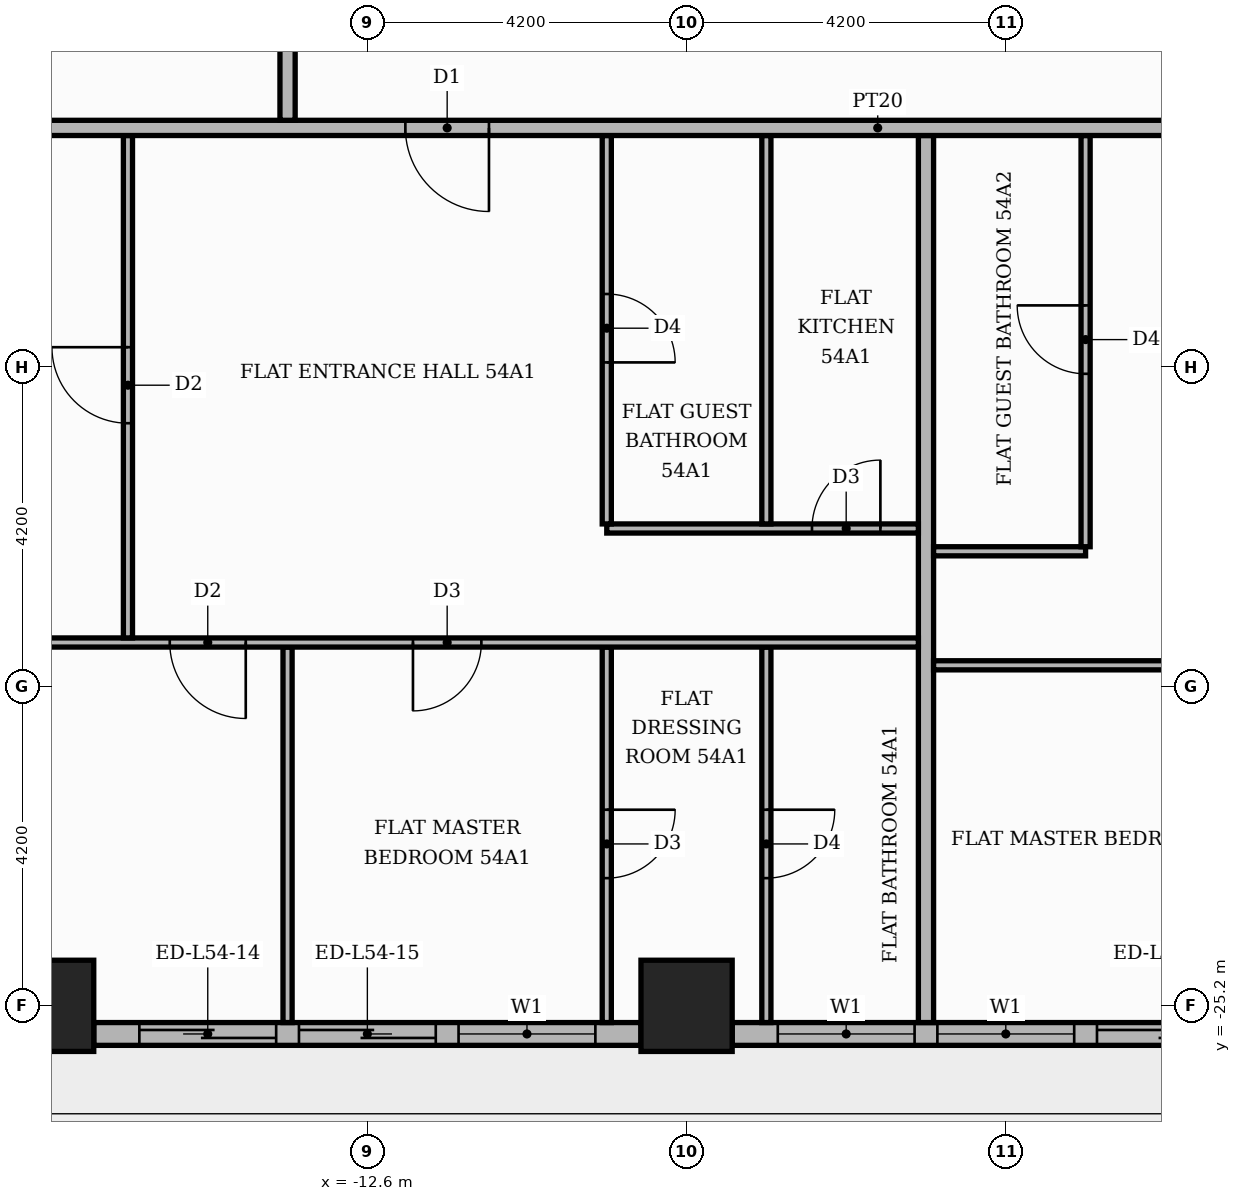
"""IFC4 building model, lengths in metres.
Left out: names, types, materials, properties, quantities, classifications, styles, units other than length and angle.
Written with IfcOpenShell. Run it as: python <this file> out.ifc"""

import sys

from ifc_helpers import new_model, si_unit, direction, frame, frame_2d, origin, origin_2d, place, context, subcontext, project, spatial, rectangle, extrude, element, fill, save


model = new_model("IFC4")
c1 = context("Model", 3, precision=1e-05, world=origin(), true_north=direction((0.0, 1.0)))
c2 = subcontext(c1, "Body", "Model", "MODEL_VIEW")
j1 = project(units=[si_unit("LENGTHUNIT", "METRE"), si_unit("PLANEANGLEUNIT", "RADIAN")], contexts=[c1])
p1 = place(None, origin())
s1 = spatial("IfcSite", under=j1, at=p1, CompositionType="ELEMENT")
p2 = place(p1, origin())
s2 = spatial("IfcBuilding", under=s1, at=p2, CompositionType="ELEMENT")
p3 = place(p2, frame((0.0, 0.0, 227.4)))
s3 = spatial("IfcBuildingStorey", under=s2, at=p3, CompositionType="ELEMENT", Elevation=227.4)
for number, where, z_axis, x_axis in (
    (1, (-8.4, -25.2, 0.0), (0.0, 0.0, 1.0), (1.0, 0.0, 0.0)),
    (2, (-16.8, -25.2, 0.0), (0.0, 0.0, 1.0), (1.0, 0.0, 0.0)),
):
    element("IfcColumn", number, at=place(p3, frame(where, z_axis=z_axis, x_axis=x_axis)), inside=s3, PredefinedType="COLUMN", context=c2, shape_type="SweptSolid", body=[
        extrude(rectangle(XDim=1.2, YDim=1.2, at=origin_2d()), origin(), (0.0, 0.0, 1.0), 3.9),
    ])
p4 = place(p3, frame((-16.2, -25.57, 0.0), z_axis=(0.0, 0.0, 1.0), x_axis=(1.0, 0.0, 0.0)))
e3 = element("IfcWall", 3, at=p4, inside=s3, PredefinedType="STANDARD", context=c2, shape_type="SweptSolid", body=[
    extrude(rectangle(XDim=7.2, YDim=0.3, at=frame_2d((3.6, 0.0))), origin(), (0.0, 0.0, 1.0), 3.48),
])
p5 = place(p4, frame((0.6, 0.0, 0.0)))
e4 = element("IfcOpeningElement", 4, at=p5, cuts=e3, PredefinedType="OPENING", context=c2, shape_type="SweptSolid", body=[
    extrude(rectangle(XDim=1.8, YDim=2.4, at=frame_2d((0.9, 1.2))), frame((0.0, 0.16, 0.0), z_axis=(0.0, -1.0, 0.0), x_axis=(1.0, 0.0, 0.0)), (0.0, 0.0, 1.0), 0.32),
])
p6 = place(p4, frame((2.7, 0.0, 0.0)))
e5 = element("IfcOpeningElement", 5, at=p6, cuts=e3, PredefinedType="OPENING", context=c2, shape_type="SweptSolid", body=[
    extrude(rectangle(XDim=1.8, YDim=2.4, at=frame_2d((0.9, 1.2))), frame((0.0, 0.16, 0.0), z_axis=(0.0, -1.0, 0.0), x_axis=(1.0, 0.0, 0.0)), (0.0, 0.0, 1.0), 0.32),
])
p7 = place(p4, frame((4.8, 0.0, 0.9)))
e6 = element("IfcOpeningElement", 6, at=p7, cuts=e3, PredefinedType="OPENING", context=c2, shape_type="SweptSolid", body=[
    extrude(rectangle(XDim=1.8, YDim=2.1, at=frame_2d((0.9, 1.05))), frame((0.0, 0.16, 0.0), z_axis=(0.0, -1.0, 0.0), x_axis=(1.0, 0.0, 0.0)), (0.0, 0.0, 1.0), 0.32),
])
p8 = place(p3, frame((-7.8, -25.57, 0.0), z_axis=(0.0, 0.0, 1.0), x_axis=(1.0, 0.0, 0.0)))
e7 = element("IfcWall", 7, at=p8, inside=s3, PredefinedType="STANDARD", context=c2, shape_type="SweptSolid", body=[
    extrude(rectangle(XDim=7.2, YDim=0.3, at=frame_2d((3.6, 0.0))), origin(), (0.0, 0.0, 1.0), 3.48),
])
p9 = place(p8, frame((0.6, 0.0, 0.9)))
e8 = element("IfcOpeningElement", 8, at=p9, cuts=e7, PredefinedType="OPENING", context=c2, shape_type="SweptSolid", body=[
    extrude(rectangle(XDim=1.8, YDim=2.1, at=frame_2d((0.9, 1.05))), frame((0.0, 0.16, 0.0), z_axis=(0.0, -1.0, 0.0), x_axis=(1.0, 0.0, 0.0)), (0.0, 0.0, 1.0), 0.32),
])
p10 = place(p8, frame((2.7, 0.0, 0.9)))
e9 = element("IfcOpeningElement", 9, at=p10, cuts=e7, PredefinedType="OPENING", context=c2, shape_type="SweptSolid", body=[
    extrude(rectangle(XDim=1.8, YDim=2.1, at=frame_2d((0.9, 1.05))), frame((0.0, 0.16, 0.0), z_axis=(0.0, -1.0, 0.0), x_axis=(1.0, 0.0, 0.0)), (0.0, 0.0, 1.0), 0.32),
])
p11 = place(p8, frame((4.8, 0.0, 0.0)))
e10 = element("IfcOpeningElement", 10, at=p11, cuts=e7, PredefinedType="OPENING", context=c2, shape_type="SweptSolid", body=[
    extrude(rectangle(XDim=1.8, YDim=2.4, at=frame_2d((0.9, 1.2))), frame((0.0, 0.16, 0.0), z_axis=(0.0, -1.0, 0.0), x_axis=(1.0, 0.0, 0.0)), (0.0, 0.0, 1.0), 0.32),
])
p12 = place(p3, frame((-13.65, -25.42, 0.0), z_axis=(0.0, 0.0, 1.0), x_axis=(0.0, 1.0, 0.0)))
e11 = element("IfcWall", 11, at=p12, inside=s3, PredefinedType="PARTITIONING", context=c2, shape_type="SweptSolid", body=[
    extrude(rectangle(XDim=4.94, YDim=0.12, at=frame_2d((2.47, 0.0))), origin(), (0.0, 0.0, 1.0), 3.48),
])
p13 = place(p3, frame((-9.45, -25.42, 0.0), z_axis=(0.0, 0.0, 1.0), x_axis=(0.0, 1.0, 0.0)))
e12 = element("IfcWall", 12, at=p13, inside=s3, PredefinedType="PARTITIONING", context=c2, shape_type="SweptSolid", body=[
    extrude(rectangle(XDim=4.94, YDim=0.12, at=frame_2d((2.47, 0.0))), origin(), (0.0, 0.0, 1.0), 3.48),
])
p14 = place(p13, frame((1.9, 0.0, 0.0)))
e13 = element("IfcOpeningElement", 13, at=p14, cuts=e12, PredefinedType="OPENING", context=c2, shape_type="SweptSolid", body=[
    extrude(rectangle(XDim=0.9, YDim=2.1, at=frame_2d((0.45, 1.05))), frame((0.0, 0.07, 0.0), z_axis=(0.0, -1.0, 0.0), x_axis=(1.0, 0.0, 0.0)), (0.0, 0.0, 1.0), 0.14),
])
p15 = place(p3, frame((-7.35, -25.42, 0.0), z_axis=(0.0, 0.0, 1.0), x_axis=(0.0, 1.0, 0.0)))
e14 = element("IfcWall", 14, at=p15, inside=s3, PredefinedType="PARTITIONING", context=c2, shape_type="SweptSolid", body=[
    extrude(rectangle(XDim=4.94, YDim=0.12, at=frame_2d((2.47, 0.0))), origin(), (0.0, 0.0, 1.0), 3.48),
])
p16 = place(p15, frame((1.9, 0.0, 0.0)))
e15 = element("IfcOpeningElement", 15, at=p16, cuts=e14, PredefinedType="OPENING", context=c2, shape_type="SweptSolid", body=[
    extrude(rectangle(XDim=0.9, YDim=2.1, at=frame_2d((0.45, 1.05))), frame((0.0, 0.07, 0.0), z_axis=(0.0, -1.0, 0.0), x_axis=(1.0, 0.0, 0.0)), (0.0, 0.0, 1.0), 0.14),
])
p17 = place(p3, frame((-5.25, -25.42, 0.0), z_axis=(0.0, 0.0, 1.0), x_axis=(0.0, 1.0, 0.0)))
e16 = element("IfcWall", 16, at=p17, inside=s3, PredefinedType="PARTITIONING", context=c2, shape_type="SweptSolid", body=[
    extrude(rectangle(XDim=11.67, YDim=0.2, at=frame_2d((5.835, 0.0))), origin(), (0.0, 0.0, 1.0), 3.48),
])
p18 = place(p3, frame((-5.15, -20.72, 0.0), z_axis=(0.0, 0.0, 1.0), x_axis=(1.0, 0.0, 0.0)))
e17 = element("IfcWall", 17, at=p18, inside=s3, PredefinedType="PARTITIONING", context=c2, shape_type="SweptSolid", body=[
    extrude(rectangle(XDim=18.7, YDim=0.12, at=frame_2d((9.35, 0.0))), origin(), (0.0, 0.0, 1.0), 3.48),
])
p19 = place(p18, frame((3.65, 0.0, 0.0)))
e18 = element("IfcOpeningElement", 18, at=p19, cuts=e17, PredefinedType="OPENING", context=c2, shape_type="SweptSolid", body=[
    extrude(rectangle(XDim=0.9, YDim=2.1, at=frame_2d((0.45, 1.05))), frame((0.0, 0.07, 0.0), z_axis=(0.0, -1.0, 0.0), x_axis=(1.0, 0.0, 0.0)), (0.0, 0.0, 1.0), 0.14),
])
p20 = place(p18, frame((15.15, 0.0, 0.0)))
e19 = element("IfcOpeningElement", 19, at=p20, cuts=e17, PredefinedType="OPENING", context=c2, shape_type="SweptSolid", body=[
    extrude(rectangle(XDim=1.0, YDim=2.1, at=frame_2d((0.5, 1.05))), frame((0.0, 0.07, 0.0), z_axis=(0.0, -1.0, 0.0), x_axis=(1.0, 0.0, 0.0)), (0.0, 0.0, 1.0), 0.14),
])
p21 = place(p3, frame((-21.219, -20.42, 0.0), z_axis=(0.0, 0.0, 1.0), x_axis=(1.0, 0.0, 0.0)))
e20 = element("IfcWall", 20, at=p21, inside=s3, PredefinedType="PARTITIONING", context=c2, shape_type="SweptSolid", body=[
    extrude(rectangle(XDim=15.869, YDim=0.12, at=frame_2d((7.935, 0.0))), origin(), (0.0, 0.0, 1.0), 3.48),
])
p22 = place(p21, frame((6.019, 0.0, 0.0)))
e21 = element("IfcOpeningElement", 21, at=p22, cuts=e20, PredefinedType="OPENING", context=c2, shape_type="SweptSolid", body=[
    extrude(rectangle(XDim=1.0, YDim=2.1, at=frame_2d((0.5, 1.05))), frame((0.0, 0.07, 0.0), z_axis=(0.0, -1.0, 0.0), x_axis=(1.0, 0.0, 0.0)), (0.0, 0.0, 1.0), 0.14),
])
p23 = place(p21, frame((9.219, 0.0, 0.0)))
e22 = element("IfcOpeningElement", 22, at=p23, cuts=e20, PredefinedType="OPENING", context=c2, shape_type="SweptSolid", body=[
    extrude(rectangle(XDim=0.9, YDim=2.1, at=frame_2d((0.45, 1.05))), frame((0.0, 0.07, 0.0), z_axis=(0.0, -1.0, 0.0), x_axis=(1.0, 0.0, 0.0)), (0.0, 0.0, 1.0), 0.14),
])
p24 = place(p3, frame((-15.75, -20.36, 0.0), z_axis=(0.0, 0.0, 1.0), x_axis=(0.0, 1.0, 0.0)))
e23 = element("IfcWall", 23, at=p24, inside=s3, PredefinedType="PARTITIONING", context=c2, shape_type="SweptSolid", body=[
    extrude(rectangle(XDim=6.61, YDim=0.12, at=frame_2d((3.305, 0.0))), origin(), (0.0, 0.0, 1.0), 3.48),
])
p25 = place(p24, frame((2.825, 0.0, 0.0)))
e24 = element("IfcOpeningElement", 24, at=p25, cuts=e23, PredefinedType="OPENING", context=c2, shape_type="SweptSolid", body=[
    extrude(rectangle(XDim=1.0, YDim=2.1, at=frame_2d((0.5, 1.05))), frame((0.0, 0.07, 0.0), z_axis=(0.0, -1.0, 0.0), x_axis=(1.0, 0.0, 0.0)), (0.0, 0.0, 1.0), 0.14),
])
p26 = place(p3, frame((-5.15, -19.22, 0.0), z_axis=(0.0, 0.0, 1.0), x_axis=(1.0, 0.0, 0.0)))
e25 = element("IfcWall", 25, at=p26, inside=s3, PredefinedType="PARTITIONING", context=c2, shape_type="SweptSolid", body=[
    extrude(rectangle(XDim=2.0, YDim=0.12, at=frame_2d((1.0, 0.0))), origin(), (0.0, 0.0, 1.0), 3.48),
])
p27 = place(p3, frame((-3.15, -19.16, 0.0), z_axis=(0.0, 0.0, 1.0), x_axis=(0.0, 1.0, 0.0)))
e26 = element("IfcWall", 26, at=p27, inside=s3, PredefinedType="PARTITIONING", context=c2, shape_type="SweptSolid", body=[
    extrude(rectangle(XDim=5.41, YDim=0.12, at=frame_2d((2.705, 0.0))), origin(), (0.0, 0.0, 1.0), 3.48),
])
p28 = place(p27, frame((2.275, 0.0, 0.0)))
e27 = element("IfcOpeningElement", 27, at=p28, cuts=e26, PredefinedType="OPENING", context=c2, shape_type="SweptSolid", body=[
    extrude(rectangle(XDim=0.9, YDim=2.1, at=frame_2d((0.45, 1.05))), frame((0.0, 0.07, 0.0), z_axis=(0.0, -1.0, 0.0), x_axis=(1.0, 0.0, 0.0)), (0.0, 0.0, 1.0), 0.14),
])
p29 = place(p3, frame((-9.45, -18.92, 0.0), z_axis=(0.0, 0.0, 1.0), x_axis=(1.0, 0.0, 0.0)))
e28 = element("IfcWall", 28, at=p29, inside=s3, PredefinedType="PARTITIONING", context=c2, shape_type="SweptSolid", body=[
    extrude(rectangle(XDim=4.1, YDim=0.12, at=frame_2d((2.05, 0.0))), origin(), (0.0, 0.0, 1.0), 3.48),
])
p30 = place(p29, frame((2.7, 0.0, 0.0)))
e29 = element("IfcOpeningElement", 29, at=p30, cuts=e28, PredefinedType="OPENING", context=c2, shape_type="SweptSolid", body=[
    extrude(rectangle(XDim=0.9, YDim=2.1, at=frame_2d((0.45, 1.05))), frame((0.0, 0.07, 0.0), z_axis=(0.0, -1.0, 0.0), x_axis=(1.0, 0.0, 0.0)), (0.0, 0.0, 1.0), 0.14),
])
p31 = place(p3, frame((-9.45, -18.86, 0.0), z_axis=(0.0, 0.0, 1.0), x_axis=(0.0, 1.0, 0.0)))
e30 = element("IfcWall", 30, at=p31, inside=s3, PredefinedType="PARTITIONING", context=c2, shape_type="SweptSolid", body=[
    extrude(rectangle(XDim=5.11, YDim=0.12, at=frame_2d((2.555, 0.0))), origin(), (0.0, 0.0, 1.0), 3.48),
])
p32 = place(p31, frame((2.125, 0.0, 0.0)))
e31 = element("IfcOpeningElement", 31, at=p32, cuts=e30, PredefinedType="OPENING", context=c2, shape_type="SweptSolid", body=[
    extrude(rectangle(XDim=0.9, YDim=2.1, at=frame_2d((0.45, 1.05))), frame((0.0, 0.07, 0.0), z_axis=(0.0, -1.0, 0.0), x_axis=(1.0, 0.0, 0.0)), (0.0, 0.0, 1.0), 0.14),
])
p33 = place(p3, frame((-7.35, -18.86, 0.0), z_axis=(0.0, 0.0, 1.0), x_axis=(0.0, 1.0, 0.0)))
e32 = element("IfcWall", 32, at=p33, inside=s3, PredefinedType="PARTITIONING", context=c2, shape_type="SweptSolid", body=[
    extrude(rectangle(XDim=5.11, YDim=0.12, at=frame_2d((2.555, 0.0))), origin(), (0.0, 0.0, 1.0), 3.48),
])
p34 = place(p3, frame((-25.42, -13.65, 0.0), z_axis=(0.0, 0.0, 1.0), x_axis=(1.0, 0.0, 0.0)))
e33 = element("IfcWall", 33, at=p34, inside=s3, PredefinedType="PARTITIONING", context=c2, shape_type="SweptSolid", body=[
    extrude(rectangle(XDim=39.07, YDim=0.2, at=frame_2d((19.535, 0.0))), origin(), (0.0, 0.0, 1.0), 3.48),
])
p35 = place(p34, frame((13.32, 0.0, 0.0)))
e34 = element("IfcOpeningElement", 34, at=p35, cuts=e33, PredefinedType="OPENING", context=c2, shape_type="SweptSolid", body=[
    extrude(rectangle(XDim=1.1, YDim=2.4, at=frame_2d((0.55, 1.2))), frame((0.0, 0.11, 0.0), z_axis=(0.0, -1.0, 0.0), x_axis=(1.0, 0.0, 0.0)), (0.0, 0.0, 1.0), 0.22),
])
p36 = place(p34, frame((23.82, 0.0, 0.0)))
e35 = element("IfcOpeningElement", 35, at=p36, cuts=e33, PredefinedType="OPENING", context=c2, shape_type="SweptSolid", body=[
    extrude(rectangle(XDim=1.1, YDim=2.4, at=frame_2d((0.55, 1.2))), frame((0.0, 0.11, 0.0), z_axis=(0.0, -1.0, 0.0), x_axis=(1.0, 0.0, 0.0)), (0.0, 0.0, 1.0), 0.22),
])
p37 = place(p3, frame((-13.65, -13.55, 0.0), z_axis=(0.0, 0.0, 1.0), x_axis=(0.0, 1.0, 0.0)))
e36 = element("IfcWall", 36, at=p37, inside=s3, PredefinedType="PARTITIONING", context=c2, shape_type="SweptSolid", body=[
    extrude(rectangle(XDim=27.1, YDim=0.2, at=frame_2d((13.55, 0.0))), origin(), (0.0, 0.0, 1.0), 3.48),
])
p38 = place(p37, frame((24.55, 0.0, 0.0)))
e37 = element("IfcOpeningElement", 37, at=p38, cuts=e36, PredefinedType="OPENING", context=c2, shape_type="SweptSolid", body=[
    extrude(rectangle(XDim=1.1, YDim=2.4, at=frame_2d((0.55, 1.2))), frame((0.0, 0.11, 0.0), z_axis=(0.0, -1.0, 0.0), x_axis=(1.0, 0.0, 0.0)), (0.0, 0.0, 1.0), 0.22),
])
p39 = place(p5, origin())
e38 = element("IfcDoor", 38, at=p39, inside=s3, OperationType="SLIDING_TO_LEFT", PredefinedType="DOOR", context=c2, shape_type="SweptSolid", body=[
    extrude(rectangle(XDim=1.8, YDim=2.4, at=frame_2d((0.9, 1.2))), frame((0.0, 0.025, 0.0), z_axis=(0.0, -1.0, 0.0), x_axis=(1.0, 0.0, 0.0)), (0.0, 0.0, 1.0), 0.05),
])
fill(e4, e38)
p40 = place(p6, origin())
e39 = element("IfcDoor", 39, at=p40, inside=s3, OperationType="SLIDING_TO_RIGHT", PredefinedType="DOOR", context=c2, shape_type="SweptSolid", body=[
    extrude(rectangle(XDim=1.8, YDim=2.4, at=frame_2d((0.9, 1.2))), frame((0.0, 0.025, 0.0), z_axis=(0.0, -1.0, 0.0), x_axis=(1.0, 0.0, 0.0)), (0.0, 0.0, 1.0), 0.05),
])
fill(e5, e39)
p41 = place(p7, origin())
e40 = element("IfcWindow", 40, at=p41, inside=s3, PartitioningType="SINGLE_PANEL", PredefinedType="WINDOW", context=c2, shape_type="SweptSolid", body=[
    extrude(rectangle(XDim=1.8, YDim=2.1, at=frame_2d((0.9, 1.05))), frame((0.0, 0.03, 0.0), z_axis=(0.0, -1.0, 0.0), x_axis=(1.0, 0.0, 0.0)), (0.0, 0.0, 1.0), 0.06),
])
fill(e6, e40)
p42 = place(p9, origin())
e41 = element("IfcWindow", 41, at=p42, inside=s3, PartitioningType="SINGLE_PANEL", PredefinedType="WINDOW", context=c2, shape_type="SweptSolid", body=[
    extrude(rectangle(XDim=1.8, YDim=2.1, at=frame_2d((0.9, 1.05))), frame((0.0, 0.03, 0.0), z_axis=(0.0, -1.0, 0.0), x_axis=(1.0, 0.0, 0.0)), (0.0, 0.0, 1.0), 0.06),
])
fill(e8, e41)
p43 = place(p10, origin())
e42 = element("IfcWindow", 42, at=p43, inside=s3, PartitioningType="SINGLE_PANEL", PredefinedType="WINDOW", context=c2, shape_type="SweptSolid", body=[
    extrude(rectangle(XDim=1.8, YDim=2.1, at=frame_2d((0.9, 1.05))), frame((0.0, 0.03, 0.0), z_axis=(0.0, -1.0, 0.0), x_axis=(1.0, 0.0, 0.0)), (0.0, 0.0, 1.0), 0.06),
])
fill(e9, e42)
p44 = place(p11, origin())
e43 = element("IfcDoor", 43, at=p44, inside=s3, OperationType="SLIDING_TO_RIGHT", PredefinedType="DOOR", context=c2, shape_type="SweptSolid", body=[
    extrude(rectangle(XDim=1.8, YDim=2.4, at=frame_2d((0.9, 1.2))), frame((0.0, 0.025, 0.0), z_axis=(0.0, -1.0, 0.0), x_axis=(1.0, 0.0, 0.0)), (0.0, 0.0, 1.0), 0.05),
])
fill(e10, e43)
p45 = place(p35, frame((1.1, 0.0, 0.0), z_axis=(0.0, 0.0, 1.0), x_axis=(-1.0, 0.0, 0.0)))
e44 = element("IfcDoor", 44, at=p45, inside=s3, OperationType="SINGLE_SWING_RIGHT", PredefinedType="DOOR", context=c2, shape_type="SweptSolid", body=[
    extrude(rectangle(XDim=1.1, YDim=2.4, at=frame_2d((0.55, 1.2))), frame((0.0, 0.025, 0.0), z_axis=(0.0, -1.0, 0.0), x_axis=(1.0, 0.0, 0.0)), (0.0, 0.0, 1.0), 0.05),
])
fill(e34, e44)
p46 = place(p25, origin())
e45 = element("IfcDoor", 45, at=p46, inside=s3, OperationType="SINGLE_SWING_RIGHT", PredefinedType="DOOR", context=c2, shape_type="SweptSolid", body=[
    extrude(rectangle(XDim=1.0, YDim=2.1, at=frame_2d((0.5, 1.05))), frame((0.0, 0.025, 0.0), z_axis=(0.0, -1.0, 0.0), x_axis=(1.0, 0.0, 0.0)), (0.0, 0.0, 1.0), 0.05),
])
fill(e24, e45)
p47 = place(p32, frame((0.9, 0.0, 0.0), z_axis=(0.0, 0.0, 1.0), x_axis=(-1.0, 0.0, 0.0)))
e46 = element("IfcDoor", 46, at=p47, inside=s3, OperationType="SINGLE_SWING_LEFT", PredefinedType="DOOR", context=c2, shape_type="SweptSolid", body=[
    extrude(rectangle(XDim=0.9, YDim=2.1, at=frame_2d((0.45, 1.05))), frame((0.0, 0.025, 0.0), z_axis=(0.0, -1.0, 0.0), x_axis=(1.0, 0.0, 0.0)), (0.0, 0.0, 1.0), 0.05),
])
fill(e31, e46)
p48 = place(p30, origin())
e47 = element("IfcDoor", 47, at=p48, inside=s3, OperationType="SINGLE_SWING_RIGHT", PredefinedType="DOOR", context=c2, shape_type="SweptSolid", body=[
    extrude(rectangle(XDim=0.9, YDim=2.1, at=frame_2d((0.45, 1.05))), frame((0.0, 0.025, 0.0), z_axis=(0.0, -1.0, 0.0), x_axis=(1.0, 0.0, 0.0)), (0.0, 0.0, 1.0), 0.05),
])
fill(e29, e47)
p49 = place(p22, frame((1.0, 0.0, 0.0), z_axis=(0.0, 0.0, 1.0), x_axis=(-1.0, 0.0, 0.0)))
e48 = element("IfcDoor", 48, at=p49, inside=s3, OperationType="SINGLE_SWING_RIGHT", PredefinedType="DOOR", context=c2, shape_type="SweptSolid", body=[
    extrude(rectangle(XDim=1.0, YDim=2.1, at=frame_2d((0.5, 1.05))), frame((0.0, 0.025, 0.0), z_axis=(0.0, -1.0, 0.0), x_axis=(1.0, 0.0, 0.0)), (0.0, 0.0, 1.0), 0.05),
])
fill(e21, e48)
p50 = place(p23, frame((0.9, 0.0, 0.0), z_axis=(0.0, 0.0, 1.0), x_axis=(-1.0, 0.0, 0.0)))
e49 = element("IfcDoor", 49, at=p50, inside=s3, OperationType="SINGLE_SWING_LEFT", PredefinedType="DOOR", context=c2, shape_type="SweptSolid", body=[
    extrude(rectangle(XDim=0.9, YDim=2.1, at=frame_2d((0.45, 1.05))), frame((0.0, 0.025, 0.0), z_axis=(0.0, -1.0, 0.0), x_axis=(1.0, 0.0, 0.0)), (0.0, 0.0, 1.0), 0.05),
])
fill(e22, e49)
p51 = place(p14, frame((0.9, 0.0, 0.0), z_axis=(0.0, 0.0, 1.0), x_axis=(-1.0, 0.0, 0.0)))
e50 = element("IfcDoor", 50, at=p51, inside=s3, OperationType="SINGLE_SWING_RIGHT", PredefinedType="DOOR", context=c2, shape_type="SweptSolid", body=[
    extrude(rectangle(XDim=0.9, YDim=2.1, at=frame_2d((0.45, 1.05))), frame((0.0, 0.025, 0.0), z_axis=(0.0, -1.0, 0.0), x_axis=(1.0, 0.0, 0.0)), (0.0, 0.0, 1.0), 0.05),
])
fill(e13, e50)
p52 = place(p16, frame((0.9, 0.0, 0.0), z_axis=(0.0, 0.0, 1.0), x_axis=(-1.0, 0.0, 0.0)))
e51 = element("IfcDoor", 51, at=p52, inside=s3, OperationType="SINGLE_SWING_RIGHT", PredefinedType="DOOR", context=c2, shape_type="SweptSolid", body=[
    extrude(rectangle(XDim=0.9, YDim=2.1, at=frame_2d((0.45, 1.05))), frame((0.0, 0.025, 0.0), z_axis=(0.0, -1.0, 0.0), x_axis=(1.0, 0.0, 0.0)), (0.0, 0.0, 1.0), 0.05),
])
fill(e15, e51)
p53 = place(p28, origin())
e52 = element("IfcDoor", 52, at=p53, inside=s3, OperationType="SINGLE_SWING_RIGHT", PredefinedType="DOOR", context=c2, shape_type="SweptSolid", body=[
    extrude(rectangle(XDim=0.9, YDim=2.1, at=frame_2d((0.45, 1.05))), frame((0.0, 0.025, 0.0), z_axis=(0.0, -1.0, 0.0), x_axis=(1.0, 0.0, 0.0)), (0.0, 0.0, 1.0), 0.05),
])
fill(e27, e52)
save(model, sys.argv[1])
